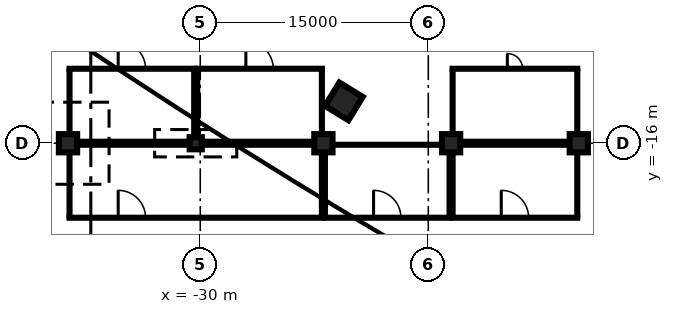
"""IFC4 building model, lengths in metres.
Left out: names, types, materials, properties, quantities, classifications, styles, units other than length and angle.
Written with IfcOpenShell. Run it as: python <this file> out.ifc"""

import sys

from ifc_helpers import new_model, si_unit, direction, frame, frame_2d, origin, origin_2d, place, context, subcontext, project, spatial, rectangle, extrude, element, fill, save


model = new_model("IFC4")
c1 = context("Model", 3, precision=1e-05, world=origin(), true_north=direction((0.0, 1.0)))
c2 = subcontext(c1, "Body", "Model", "MODEL_VIEW")
j1 = project(units=[si_unit("LENGTHUNIT", "METRE"), si_unit("PLANEANGLEUNIT", "RADIAN")], contexts=[c1])
p1 = place(None, origin())
s1 = spatial("IfcSite", under=j1, at=p1, CompositionType="ELEMENT")
p2 = place(p1, origin())
s2 = spatial("IfcBuilding", under=s1, at=p2, CompositionType="ELEMENT")
p3 = place(p2, frame((0.0, 0.0, -12.0)))
s3 = spatial("IfcBuildingStorey", under=s2, at=p3, CompositionType="ELEMENT", Elevation=-12.0)
p4 = place(p3, frame((-20.552, -13.248, 0.0), z_axis=(0.0, 0.0, 1.0), x_axis=(0.523429826947, 0.85206878611, 0.0)))
e1 = element("IfcColumn", 1, at=p4, inside=s3, PredefinedType="COLUMN", context=c2, shape_type="SweptSolid", body=[
    extrude(rectangle(XDim=1.8, YDim=1.8, at=origin_2d()), origin(), (0.0, 0.0, 1.0), 4.4),
])
p5 = place(p3, frame((-38.7, -16.0, 0.0), z_axis=(0.0, 0.0, 1.0), x_axis=(1.0, 0.0, 0.0)))
e2 = element("IfcColumn", 2, at=p5, inside=s3, PredefinedType="COLUMN", context=c2, shape_type="SweptSolid", body=[
    extrude(rectangle(XDim=1.2, YDim=1.2, at=origin_2d()), origin(), (0.0, 0.0, 1.0), 4.4),
])
p6 = place(p3, frame((-30.3, -16.0, 0.0), z_axis=(0.0, 0.0, 1.0), x_axis=(1.0, 0.0, 0.0)))
e3 = element("IfcColumn", 3, at=p6, inside=s3, PredefinedType="COLUMN", context=c2, shape_type="SweptSolid", body=[
    extrude(rectangle(XDim=0.8, YDim=0.8, at=origin_2d()), origin(), (0.0, 0.0, 1.0), 4.4),
])
for number, where, z_axis, x_axis in (
    (4, (-21.9, -16.0, 0.0), (0.0, 0.0, 1.0), (1.0, 0.0, 0.0)),
    (5, (-13.5, -16.0, 0.0), (0.0, 0.0, 1.0), (1.0, 0.0, 0.0)),
    (6, (-5.1, -16.0, 0.0), (0.0, 0.0, 1.0), (1.0, 0.0, 0.0)),
):
    element("IfcColumn", number, at=place(p3, frame(where, z_axis=z_axis, x_axis=x_axis)), inside=s3, PredefinedType="COLUMN", context=c2, shape_type="SweptSolid", body=[
        extrude(rectangle(XDim=1.2, YDim=1.2, at=origin_2d()), origin(), (0.0, 0.0, 1.0), 4.4),
    ])
p7 = place(p3, frame((-38.7, -20.9, 0.0), z_axis=(0.0, 0.0, 1.0), x_axis=(1.0, 0.0, 0.0)))
e7 = element("IfcWall", 7, at=p7, inside=s3, PredefinedType="PARTITIONING", context=c2, shape_type="SweptSolid", body=[
    extrude(rectangle(XDim=16.8, YDim=0.2, at=frame_2d((8.4, 0.0))), origin(), (0.0, 0.0, 1.0), 4.4),
])
p8 = place(p7, frame((3.3, 0.0, 0.0)))
e8 = element("IfcOpeningElement", 8, at=p8, cuts=e7, PredefinedType="OPENING", context=c2, shape_type="SweptSolid", body=[
    extrude(rectangle(XDim=1.8, YDim=2.1, at=frame_2d((0.9, 1.05))), frame((0.0, 0.11, 0.0), z_axis=(0.0, -1.0, 0.0), x_axis=(1.0, 0.0, 0.0)), (0.0, 0.0, 1.0), 0.22),
])
p9 = place(p3, frame((-38.7, -16.1, 0.0), z_axis=(0.0, 0.0, 1.0), x_axis=(1.0, 0.0, 0.0)))
e9 = element("IfcWall", 9, at=p9, inside=s3, PredefinedType="PARTITIONING", context=c2, shape_type="SweptSolid", body=[
    extrude(rectangle(XDim=16.8, YDim=0.2, at=frame_2d((8.4, 0.0))), origin(), (0.0, 0.0, 1.0), 4.4),
])
for number, where, z_axis, x_axis in (
    (10, (-38.6, -20.8, 0.0), (0.0, 0.0, 1.0), (0.0, 1.0, 0.0)),
    (11, (-22.0, -20.8, 0.0), (0.0, 0.0, 1.0), (0.0, 1.0, 0.0)),
):
    element("IfcWall", number, at=place(p3, frame(where, z_axis=z_axis, x_axis=x_axis)), inside=s3, PredefinedType="PARTITIONING", context=c2, shape_type="SweptSolid", body=[
        extrude(rectangle(XDim=4.2, YDim=0.2, at=frame_2d((2.1, 0.0))), origin(), (0.0, 0.0, 1.0), 4.4),
    ])
p10 = place(p3, frame((-21.9, -20.9, 0.0), z_axis=(0.0, 0.0, 1.0), x_axis=(1.0, 0.0, 0.0)))
e12 = element("IfcWall", 12, at=p10, inside=s3, PredefinedType="PARTITIONING", context=c2, shape_type="SweptSolid", body=[
    extrude(rectangle(XDim=8.4, YDim=0.2, at=frame_2d((4.2, 0.0))), origin(), (0.0, 0.0, 1.0), 4.4),
])
p11 = place(p10, frame((3.3, 0.0, 0.0)))
e13 = element("IfcOpeningElement", 13, at=p11, cuts=e12, PredefinedType="OPENING", context=c2, shape_type="SweptSolid", body=[
    extrude(rectangle(XDim=1.8, YDim=2.1, at=frame_2d((0.9, 1.05))), frame((0.0, 0.11, 0.0), z_axis=(0.0, -1.0, 0.0), x_axis=(1.0, 0.0, 0.0)), (0.0, 0.0, 1.0), 0.22),
])
p12 = place(p3, frame((-21.9, -16.1, 0.0), z_axis=(0.0, 0.0, 1.0), x_axis=(1.0, 0.0, 0.0)))
e14 = element("IfcWall", 14, at=p12, inside=s3, PredefinedType="PARTITIONING", context=c2, shape_type="SweptSolid", body=[
    extrude(rectangle(XDim=8.4, YDim=0.2, at=frame_2d((4.2, 0.0))), origin(), (0.0, 0.0, 1.0), 4.4),
])
for number, where, z_axis, x_axis in (
    (15, (-21.8, -20.8, 0.0), (0.0, 0.0, 1.0), (0.0, 1.0, 0.0)),
    (16, (-13.6, -20.8, 0.0), (0.0, 0.0, 1.0), (0.0, 1.0, 0.0)),
):
    element("IfcWall", number, at=place(p3, frame(where, z_axis=z_axis, x_axis=x_axis)), inside=s3, PredefinedType="PARTITIONING", context=c2, shape_type="SweptSolid", body=[
        extrude(rectangle(XDim=4.2, YDim=0.2, at=frame_2d((2.1, 0.0))), origin(), (0.0, 0.0, 1.0), 4.4),
    ])
p13 = place(p3, frame((-13.5, -20.9, 0.0), z_axis=(0.0, 0.0, 1.0), x_axis=(1.0, 0.0, 0.0)))
e17 = element("IfcWall", 17, at=p13, inside=s3, PredefinedType="PARTITIONING", context=c2, shape_type="SweptSolid", body=[
    extrude(rectangle(XDim=8.4, YDim=0.2, at=frame_2d((4.2, 0.0))), origin(), (0.0, 0.0, 1.0), 4.4),
])
p14 = place(p13, frame((3.3, 0.0, 0.0)))
e18 = element("IfcOpeningElement", 18, at=p14, cuts=e17, PredefinedType="OPENING", context=c2, shape_type="SweptSolid", body=[
    extrude(rectangle(XDim=1.8, YDim=2.1, at=frame_2d((0.9, 1.05))), frame((0.0, 0.11, 0.0), z_axis=(0.0, -1.0, 0.0), x_axis=(1.0, 0.0, 0.0)), (0.0, 0.0, 1.0), 0.22),
])
p15 = place(p3, frame((-13.5, -16.1, 0.0), z_axis=(0.0, 0.0, 1.0), x_axis=(1.0, 0.0, 0.0)))
e19 = element("IfcWall", 19, at=p15, inside=s3, PredefinedType="PARTITIONING", context=c2, shape_type="SweptSolid", body=[
    extrude(rectangle(XDim=8.4, YDim=0.2, at=frame_2d((4.2, 0.0))), origin(), (0.0, 0.0, 1.0), 4.4),
])
for number, where, z_axis, x_axis in (
    (20, (-13.4, -20.8, 0.0), (0.0, 0.0, 1.0), (0.0, 1.0, 0.0)),
    (21, (-5.2, -20.8, 0.0), (0.0, 0.0, 1.0), (0.0, 1.0, 0.0)),
):
    element("IfcWall", number, at=place(p3, frame(where, z_axis=z_axis, x_axis=x_axis)), inside=s3, PredefinedType="PARTITIONING", context=c2, shape_type="SweptSolid", body=[
        extrude(rectangle(XDim=4.2, YDim=0.2, at=frame_2d((2.1, 0.0))), origin(), (0.0, 0.0, 1.0), 4.4),
    ])
p16 = place(p3, frame((-38.7, -15.9, 0.0), z_axis=(0.0, 0.0, 1.0), x_axis=(1.0, 0.0, 0.0)))
e22 = element("IfcWall", 22, at=p16, inside=s3, PredefinedType="PARTITIONING", context=c2, shape_type="SweptSolid", body=[
    extrude(rectangle(XDim=8.4, YDim=0.2, at=frame_2d((4.2, 0.0))), origin(), (0.0, 0.0, 1.0), 4.4),
])
p17 = place(p3, frame((-38.7, -11.1, 0.0), z_axis=(0.0, 0.0, 1.0), x_axis=(1.0, 0.0, 0.0)))
e23 = element("IfcWall", 23, at=p17, inside=s3, PredefinedType="PARTITIONING", context=c2, shape_type="SweptSolid", body=[
    extrude(rectangle(XDim=8.4, YDim=0.2, at=frame_2d((4.2, 0.0))), origin(), (0.0, 0.0, 1.0), 4.4),
])
p18 = place(p17, frame((3.3, 0.0, 0.0)))
e24 = element("IfcOpeningElement", 24, at=p18, cuts=e23, PredefinedType="OPENING", context=c2, shape_type="SweptSolid", body=[
    extrude(rectangle(XDim=1.8, YDim=2.1, at=frame_2d((0.9, 1.05))), frame((0.0, 0.11, 0.0), z_axis=(0.0, -1.0, 0.0), x_axis=(1.0, 0.0, 0.0)), (0.0, 0.0, 1.0), 0.22),
])
p19 = place(p3, frame((-38.6, -15.4, 0.0), z_axis=(0.0, 0.0, 1.0), x_axis=(0.0, 1.0, 0.0)))
e25 = element("IfcWall", 25, at=p19, inside=s3, PredefinedType="PARTITIONING", context=c2, shape_type="SweptSolid", body=[
    extrude(rectangle(XDim=4.2, YDim=0.2, at=frame_2d((2.1, 0.0))), origin(), (0.0, 0.0, 1.0), 4.4),
])
p20 = place(p3, frame((-30.4, -15.6, 0.0), z_axis=(0.0, 0.0, 1.0), x_axis=(0.0, 1.0, 0.0)))
e26 = element("IfcWall", 26, at=p20, inside=s3, PredefinedType="PARTITIONING", context=c2, shape_type="SweptSolid", body=[
    extrude(rectangle(XDim=4.4, YDim=0.2, at=frame_2d((2.2, 0.0))), origin(), (0.0, 0.0, 1.0), 4.4),
])
p21 = place(p3, frame((-30.3, -15.9, 0.0), z_axis=(0.0, 0.0, 1.0), x_axis=(1.0, 0.0, 0.0)))
e27 = element("IfcWall", 27, at=p21, inside=s3, PredefinedType="PARTITIONING", context=c2, shape_type="SweptSolid", body=[
    extrude(rectangle(XDim=8.4, YDim=0.2, at=frame_2d((4.2, 0.0))), origin(), (0.0, 0.0, 1.0), 4.4),
])
p22 = place(p3, frame((-30.3, -11.1, 0.0), z_axis=(0.0, 0.0, 1.0), x_axis=(1.0, 0.0, 0.0)))
e28 = element("IfcWall", 28, at=p22, inside=s3, PredefinedType="PARTITIONING", context=c2, shape_type="SweptSolid", body=[
    extrude(rectangle(XDim=8.4, YDim=0.2, at=frame_2d((4.2, 0.0))), origin(), (0.0, 0.0, 1.0), 4.4),
])
p23 = place(p22, frame((3.3, 0.0, 0.0)))
e29 = element("IfcOpeningElement", 29, at=p23, cuts=e28, PredefinedType="OPENING", context=c2, shape_type="SweptSolid", body=[
    extrude(rectangle(XDim=1.8, YDim=2.1, at=frame_2d((0.9, 1.05))), frame((0.0, 0.11, 0.0), z_axis=(0.0, -1.0, 0.0), x_axis=(1.0, 0.0, 0.0)), (0.0, 0.0, 1.0), 0.22),
])
p24 = place(p3, frame((-30.2, -15.6, 0.0), z_axis=(0.0, 0.0, 1.0), x_axis=(0.0, 1.0, 0.0)))
e30 = element("IfcWall", 30, at=p24, inside=s3, PredefinedType="PARTITIONING", context=c2, shape_type="SweptSolid", body=[
    extrude(rectangle(XDim=4.4, YDim=0.2, at=frame_2d((2.2, 0.0))), origin(), (0.0, 0.0, 1.0), 4.4),
])
p25 = place(p3, frame((-22.0, -15.4, 0.0), z_axis=(0.0, 0.0, 1.0), x_axis=(0.0, 1.0, 0.0)))
e31 = element("IfcWall", 31, at=p25, inside=s3, PredefinedType="PARTITIONING", context=c2, shape_type="SweptSolid", body=[
    extrude(rectangle(XDim=4.2, YDim=0.2, at=frame_2d((2.1, 0.0))), origin(), (0.0, 0.0, 1.0), 4.4),
])
p26 = place(p3, frame((-13.5, -15.9, 0.0), z_axis=(0.0, 0.0, 1.0), x_axis=(1.0, 0.0, 0.0)))
e32 = element("IfcWall", 32, at=p26, inside=s3, PredefinedType="PARTITIONING", context=c2, shape_type="SweptSolid", body=[
    extrude(rectangle(XDim=8.4, YDim=0.2, at=frame_2d((4.2, 0.0))), origin(), (0.0, 0.0, 1.0), 4.4),
])
p27 = place(p3, frame((-13.5, -11.1, 0.0), z_axis=(0.0, 0.0, 1.0), x_axis=(1.0, 0.0, 0.0)))
e33 = element("IfcWall", 33, at=p27, inside=s3, PredefinedType="PARTITIONING", context=c2, shape_type="SweptSolid", body=[
    extrude(rectangle(XDim=8.4, YDim=0.2, at=frame_2d((4.2, 0.0))), origin(), (0.0, 0.0, 1.0), 4.4),
])
p28 = place(p27, frame((3.7, 0.0, 0.0)))
e34 = element("IfcOpeningElement", 34, at=p28, cuts=e33, PredefinedType="OPENING", context=c2, shape_type="SweptSolid", body=[
    extrude(rectangle(XDim=1.0, YDim=2.1, at=frame_2d((0.5, 1.05))), frame((0.0, 0.11, 0.0), z_axis=(0.0, -1.0, 0.0), x_axis=(1.0, 0.0, 0.0)), (0.0, 0.0, 1.0), 0.22),
])
for number, where, z_axis, x_axis in (
    (35, (-13.4, -15.4, 0.0), (0.0, 0.0, 1.0), (0.0, 1.0, 0.0)),
    (36, (-5.2, -15.4, 0.0), (0.0, 0.0, 1.0), (0.0, 1.0, 0.0)),
):
    element("IfcWall", number, at=place(p3, frame(where, z_axis=z_axis, x_axis=x_axis)), inside=s3, PredefinedType="PARTITIONING", context=c2, shape_type="SweptSolid", body=[
        extrude(rectangle(XDim=4.2, YDim=0.2, at=frame_2d((2.1, 0.0))), origin(), (0.0, 0.0, 1.0), 4.4),
    ])
p29 = place(p8, origin())
e37 = element("IfcDoor", 37, at=p29, inside=s3, OperationType="DOUBLE_DOOR_SINGLE_SWING", PredefinedType="DOOR", context=c2, shape_type="SweptSolid", body=[
    extrude(rectangle(XDim=1.8, YDim=2.1, at=frame_2d((0.9, 1.05))), frame((0.0, 0.025, 0.0), z_axis=(0.0, -1.0, 0.0), x_axis=(1.0, 0.0, 0.0)), (0.0, 0.0, 1.0), 0.05),
])
fill(e8, e37)
p30 = place(p11, origin())
e38 = element("IfcDoor", 38, at=p30, inside=s3, OperationType="DOUBLE_DOOR_SINGLE_SWING", PredefinedType="DOOR", context=c2, shape_type="SweptSolid", body=[
    extrude(rectangle(XDim=1.8, YDim=2.1, at=frame_2d((0.9, 1.05))), frame((0.0, 0.025, 0.0), z_axis=(0.0, -1.0, 0.0), x_axis=(1.0, 0.0, 0.0)), (0.0, 0.0, 1.0), 0.05),
])
fill(e13, e38)
p31 = place(p14, origin())
e39 = element("IfcDoor", 39, at=p31, inside=s3, OperationType="DOUBLE_DOOR_SINGLE_SWING", PredefinedType="DOOR", context=c2, shape_type="SweptSolid", body=[
    extrude(rectangle(XDim=1.8, YDim=2.1, at=frame_2d((0.9, 1.05))), frame((0.0, 0.025, 0.0), z_axis=(0.0, -1.0, 0.0), x_axis=(1.0, 0.0, 0.0)), (0.0, 0.0, 1.0), 0.05),
])
fill(e18, e39)
p32 = place(p18, origin())
e40 = element("IfcDoor", 40, at=p32, inside=s3, OperationType="DOUBLE_DOOR_SINGLE_SWING", PredefinedType="DOOR", context=c2, shape_type="SweptSolid", body=[
    extrude(rectangle(XDim=1.8, YDim=2.1, at=frame_2d((0.9, 1.05))), frame((0.0, 0.025, 0.0), z_axis=(0.0, -1.0, 0.0), x_axis=(1.0, 0.0, 0.0)), (0.0, 0.0, 1.0), 0.05),
])
fill(e24, e40)
p33 = place(p23, origin())
e41 = element("IfcDoor", 41, at=p33, inside=s3, OperationType="DOUBLE_DOOR_SINGLE_SWING", PredefinedType="DOOR", context=c2, shape_type="SweptSolid", body=[
    extrude(rectangle(XDim=1.8, YDim=2.1, at=frame_2d((0.9, 1.05))), frame((0.0, 0.025, 0.0), z_axis=(0.0, -1.0, 0.0), x_axis=(1.0, 0.0, 0.0)), (0.0, 0.0, 1.0), 0.05),
])
fill(e29, e41)
p34 = place(p28, origin())
e42 = element("IfcDoor", 42, at=p34, inside=s3, OperationType="SINGLE_SWING_LEFT", PredefinedType="DOOR", context=c2, shape_type="SweptSolid", body=[
    extrude(rectangle(XDim=1.0, YDim=2.1, at=frame_2d((0.5, 1.05))), frame((0.0, 0.025, 0.0), z_axis=(0.0, -1.0, 0.0), x_axis=(1.0, 0.0, 0.0)), (0.0, 0.0, 1.0), 0.05),
])
fill(e34, e42)
save(model, sys.argv[1])
